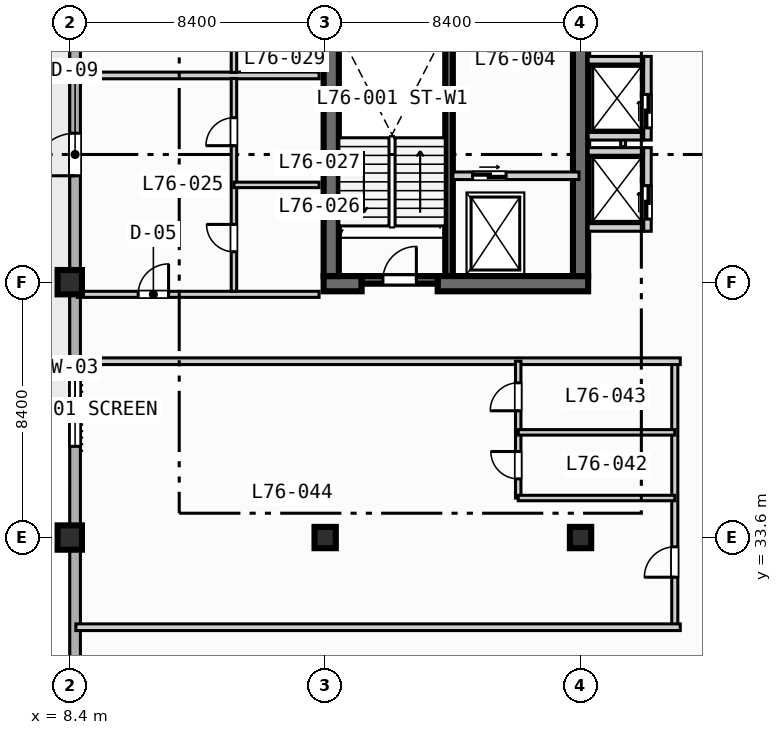
"""IFC4 building model, lengths in metres.
Left out: names, types, materials, properties, quantities, classifications, styles, units other than length and angle.
Written with IfcOpenShell. Run it as: python <this file> out.ifc"""

import sys

from ifc_helpers import new_model, si_unit, direction, frame, frame_2d, origin, origin_2d, place, context, subcontext, project, spatial, rectangle, extrude, element, fill, save


model = new_model("IFC4")
c1 = context("Model", 3, precision=1e-05, world=origin(), true_north=direction((0.0, 1.0)))
c2 = subcontext(c1, "Body", "Model", "MODEL_VIEW")
j1 = project(units=[si_unit("LENGTHUNIT", "METRE"), si_unit("PLANEANGLEUNIT", "RADIAN")], contexts=[c1])
p1 = place(None, origin())
s1 = spatial("IfcSite", under=j1, at=p1, CompositionType="ELEMENT")
p2 = place(p1, origin())
s2 = spatial("IfcBuilding", under=s1, at=p2, CompositionType="ELEMENT")
p3 = place(p2, frame((0.0, 0.0, 308.6)))
s3 = spatial("IfcBuildingStorey", under=s2, at=p3, CompositionType="ELEMENT", Elevation=308.6)
p4 = place(p3, frame((20.875, 42.2, 0.0), z_axis=(0.0, 0.0, 1.0), x_axis=(0.0, 1.0, 0.0)))
e1 = element("IfcWall", 1, at=p4, inside=s3, PredefinedType="SOLIDWALL", context=c2, shape_type="SweptSolid", body=[
    extrude(rectangle(XDim=8.05, YDim=0.25, at=frame_2d((4.025, 0.0))), origin(), (0.0, 0.0, 1.0), 3.67),
])
p5 = place(p3, frame((16.75, 41.95, 0.0), z_axis=(0.0, 0.0, 1.0), x_axis=(1.0, 0.0, 0.0)))
e2 = element("IfcWall", 2, at=p5, inside=s3, PredefinedType="SHEAR", context=c2, shape_type="SweptSolid", body=[
    extrude(rectangle(XDim=1.25, YDim=0.5, at=frame_2d((0.625, 0.0))), origin(), (0.0, 0.0, 1.0), 3.67),
])
p6 = place(p3, frame((20.5, 41.95, 0.0), z_axis=(0.0, 0.0, 1.0), x_axis=(1.0, 0.0, 0.0)))
e3 = element("IfcWall", 3, at=p6, inside=s3, PredefinedType="SHEAR", context=c2, shape_type="SweptSolid", body=[
    extrude(rectangle(XDim=4.95, YDim=0.5, at=frame_2d((2.475, 0.0))), origin(), (0.0, 0.0, 1.0), 3.67),
])
p7 = place(p3, frame((17.0, 42.2, 0.0), z_axis=(0.0, 0.0, 1.0), x_axis=(0.0, 1.0, 0.0)))
e4 = element("IfcWall", 4, at=p7, inside=s3, PredefinedType="SHEAR", context=c2, shape_type="SweptSolid", body=[
    extrude(rectangle(XDim=16.35, YDim=0.5, at=frame_2d((8.175, 0.0))), origin(), (0.0, 0.0, 1.0), 3.67),
])
p8 = place(p3, frame((25.2, 42.2, 0.0), z_axis=(0.0, 0.0, 1.0), x_axis=(0.0, 1.0, 0.0)))
e5 = element("IfcWall", 5, at=p8, inside=s3, PredefinedType="SHEAR", context=c2, shape_type="SweptSolid", body=[
    extrude(rectangle(XDim=8.6, YDim=0.5, at=frame_2d((4.3, 0.0))), origin(), (0.0, 0.0, 1.0), 3.67),
])
for number, where, z_axis, x_axis in (
    (6, (8.4, 33.6, 0.0), (0.0, 0.0, 1.0), (1.0, 0.0, 0.0)),
    (7, (8.4, 42.0, 0.0), (0.0, 0.0, 1.0), (1.0, 0.0, 0.0)),
):
    element("IfcColumn", number, at=place(p3, frame(where, z_axis=z_axis, x_axis=x_axis)), inside=s3, PredefinedType="COLUMN", context=c2, shape_type="SweptSolid", body=[
        extrude(rectangle(XDim=0.8, YDim=0.8, at=origin_2d()), origin(), (0.0, 0.0, 1.0), 3.9),
    ])
for number, where, z_axis, x_axis in (
    (8, (16.8, 33.6, 0.0), (0.0, 0.0, 1.0), (1.0, 0.0, 0.0)),
    (9, (25.2, 33.6, 0.0), (0.0, 0.0, 1.0), (1.0, 0.0, 0.0)),
):
    element("IfcColumn", number, at=place(p3, frame(where, z_axis=z_axis, x_axis=x_axis)), inside=s3, PredefinedType="COLUMN", context=c2, shape_type="SweptSolid", body=[
        extrude(rectangle(XDim=0.7, YDim=0.7, at=origin_2d()), origin(), (0.0, 0.0, 1.0), 3.9),
    ])
p9 = place(p3, frame((8.575, 11.575, 0.0), z_axis=(0.0, 0.0, 1.0), x_axis=(0.0, 1.0, 0.0)))
e10 = element("IfcWall", 10, at=p9, inside=s3, PredefinedType="STANDARD", context=c2, shape_type="SweptSolid", body=[
    extrude(rectangle(XDim=60.85, YDim=0.35, at=frame_2d((30.425, 0.0))), origin(), (0.0, 0.0, 1.0), 3.67),
])
p10 = place(p9, frame((33.925, 0.0, 0.0)))
e11 = element("IfcOpeningElement", 11, at=p10, cuts=e10, PredefinedType="OPENING", context=c2, shape_type="SweptSolid", body=[
    extrude(rectangle(XDim=1.4, YDim=2.2, at=frame_2d((0.7, 1.1))), frame((0.0, 0.185, 0.0), z_axis=(0.0, -1.0, 0.0), x_axis=(1.0, 0.0, 0.0)), (0.0, 0.0, 1.0), 0.37),
])
p11 = place(p9, frame((25.025, 0.0, 0.85)))
e12 = element("IfcOpeningElement", 12, at=p11, cuts=e10, PredefinedType="OPENING", context=c2, shape_type="SweptSolid", body=[
    extrude(rectangle(XDim=2.4, YDim=1.95, at=frame_2d((1.2, 0.975))), frame((0.0, 0.185, 0.0), z_axis=(0.0, -1.0, 0.0), x_axis=(1.0, 0.0, 0.0)), (0.0, 0.0, 1.0), 0.37),
])
p12 = place(p9, frame((41.825, 0.0, 0.85)))
e13 = element("IfcOpeningElement", 13, at=p12, cuts=e10, PredefinedType="OPENING", context=c2, shape_type="SweptSolid", body=[
    extrude(rectangle(XDim=2.4, YDim=1.95, at=frame_2d((1.2, 0.975))), frame((0.0, 0.185, 0.0), z_axis=(0.0, -1.0, 0.0), x_axis=(1.0, 0.0, 0.0)), (0.0, 0.0, 1.0), 0.37),
])
p13 = place(p3, frame((18.0, 42.075, 0.0), z_axis=(0.0, 0.0, 1.0), x_axis=(1.0, 0.0, 0.0)))
e14 = element("IfcWall", 14, at=p13, inside=s3, PredefinedType="SOLIDWALL", context=c2, shape_type="SweptSolid", body=[
    extrude(rectangle(XDim=2.5, YDim=0.25, at=frame_2d((1.25, 0.0))), origin(), (0.0, 0.0, 1.0), 3.67),
])
p14 = place(p13, frame((0.7, 0.0, 0.0)))
e15 = element("IfcOpeningElement", 15, at=p14, cuts=e14, PredefinedType="OPENING", context=c2, shape_type="SweptSolid", body=[
    extrude(rectangle(XDim=1.1, YDim=2.15, at=frame_2d((0.55, 1.075))), frame((0.0, 0.135, 0.0), z_axis=(0.0, -1.0, 0.0), x_axis=(1.0, 0.0, 0.0)), (0.0, 0.0, 1.0), 0.27),
])
p15 = place(p3, frame((21.0, 45.5, 0.0), z_axis=(0.0, 0.0, 1.0), x_axis=(1.0, 0.0, 0.0)))
e16 = element("IfcWall", 16, at=p15, inside=s3, PredefinedType="SOLIDWALL", context=c2, shape_type="SweptSolid", body=[
    extrude(rectangle(XDim=4.15, YDim=0.25, at=frame_2d((2.075, 0.0))), origin(), (0.0, 0.0, 1.0), 3.67),
])
p16 = place(p15, frame((0.65, 0.0, 0.0)))
e17 = element("IfcOpeningElement", 17, at=p16, cuts=e16, PredefinedType="OPENING", context=c2, shape_type="SweptSolid", body=[
    extrude(rectangle(XDim=1.1, YDim=2.15, at=frame_2d((0.55, 1.075))), frame((0.0, 0.135, 0.0), z_axis=(0.0, -1.0, 0.0), x_axis=(1.0, 0.0, 0.0)), (0.0, 0.0, 1.0), 0.27),
])
p17 = place(p3, frame((27.4, 43.675, 0.0), z_axis=(0.0, 0.0, 1.0), x_axis=(0.0, 1.0, 0.0)))
e18 = element("IfcWall", 18, at=p17, inside=s3, PredefinedType="SOLIDWALL", context=c2, shape_type="SweptSolid", body=[
    extrude(rectangle(XDim=2.75, YDim=0.25, at=frame_2d((1.375, 0.0))), origin(), (0.0, 0.0, 1.0), 3.67),
])
p18 = place(p17, frame((0.4, 0.0, 0.0)))
e19 = element("IfcOpeningElement", 19, at=p18, cuts=e18, PredefinedType="OPENING", context=c2, shape_type="SweptSolid", body=[
    extrude(rectangle(XDim=1.1, YDim=2.15, at=frame_2d((0.55, 1.075))), frame((0.0, 0.135, 0.0), z_axis=(0.0, -1.0, 0.0), x_axis=(1.0, 0.0, 0.0)), (0.0, 0.0, 1.0), 0.27),
])
for number, where, z_axis, x_axis in (
    (20, (25.45, 43.8, 0.0), (0.0, 0.0, 1.0), (1.0, 0.0, 0.0)),
    (21, (25.45, 46.3, 0.0), (0.0, 0.0, 1.0), (1.0, 0.0, 0.0)),
):
    element("IfcWall", number, at=place(p3, frame(where, z_axis=z_axis, x_axis=x_axis)), inside=s3, PredefinedType="SOLIDWALL", context=c2, shape_type="SweptSolid", body=[
        extrude(rectangle(XDim=1.825, YDim=0.25, at=frame_2d((0.913, 0.0))), origin(), (0.0, 0.0, 1.0), 3.67),
    ])
p19 = place(p3, frame((26.6, 46.46, 0.0), z_axis=(0.0, 0.0, 1.0), x_axis=(0.0, 1.0, 0.0)))
e22 = element("IfcWall", 22, at=p19, inside=s3, PredefinedType="PARTITIONING", context=c2, shape_type="SweptSolid", body=[
    extrude(rectangle(XDim=0.88, YDim=0.16, at=frame_2d((0.44, 0.0))), origin(), (0.0, 0.0, 1.0), 3.67),
])
p20 = place(p3, frame((27.4, 46.675, 0.0), z_axis=(0.0, 0.0, 1.0), x_axis=(0.0, 1.0, 0.0)))
e23 = element("IfcWall", 23, at=p20, inside=s3, PredefinedType="SOLIDWALL", context=c2, shape_type="SweptSolid", body=[
    extrude(rectangle(XDim=2.75, YDim=0.25, at=frame_2d((1.375, 0.0))), origin(), (0.0, 0.0, 1.0), 3.67),
])
p21 = place(p20, frame((0.4, 0.0, 0.0)))
e24 = element("IfcOpeningElement", 24, at=p21, cuts=e23, PredefinedType="OPENING", context=c2, shape_type="SweptSolid", body=[
    extrude(rectangle(XDim=1.1, YDim=2.15, at=frame_2d((0.55, 1.075))), frame((0.0, 0.135, 0.0), z_axis=(0.0, -1.0, 0.0), x_axis=(1.0, 0.0, 0.0)), (0.0, 0.0, 1.0), 0.27),
])
for number, where, z_axis, x_axis in (
    (25, (25.45, 46.8, 0.0), (0.0, 0.0, 1.0), (1.0, 0.0, 0.0)),
    (26, (25.45, 49.3, 0.0), (0.0, 0.0, 1.0), (1.0, 0.0, 0.0)),
):
    element("IfcWall", number, at=place(p3, frame(where, z_axis=z_axis, x_axis=x_axis)), inside=s3, PredefinedType="SOLIDWALL", context=c2, shape_type="SweptSolid", body=[
        extrude(rectangle(XDim=1.825, YDim=0.25, at=frame_2d((0.913, 0.0))), origin(), (0.0, 0.0, 1.0), 3.67),
    ])
p22 = place(p3, frame((8.65, 41.6, 0.0), z_axis=(0.0, 0.0, 1.0), x_axis=(1.0, 0.0, 0.0)))
e27 = element("IfcWall", 27, at=p22, inside=s3, PredefinedType="PARTITIONING", context=c2, shape_type="SweptSolid", body=[
    extrude(rectangle(XDim=7.95, YDim=0.2, at=frame_2d((3.975, 0.0))), origin(), (0.0, 0.0, 1.0), 3.67),
])
p23 = place(p22, frame((2.0, 0.0, 0.0)))
e28 = element("IfcOpeningElement", 28, at=p23, cuts=e27, PredefinedType="OPENING", context=c2, shape_type="SweptSolid", body=[
    extrude(rectangle(XDim=1.0, YDim=2.15, at=frame_2d((0.5, 1.075))), frame((0.0, 0.11, 0.0), z_axis=(0.0, -1.0, 0.0), x_axis=(1.0, 0.0, 0.0)), (0.0, 0.0, 1.0), 0.22),
])
p24 = place(p3, frame((8.65, 48.8, 0.0), z_axis=(0.0, 0.0, 1.0), x_axis=(1.0, 0.0, 0.0)))
e29 = element("IfcWall", 29, at=p24, inside=s3, PredefinedType="PARTITIONING", context=c2, shape_type="SweptSolid", body=[
    extrude(rectangle(XDim=7.95, YDim=0.22, at=frame_2d((3.975, 0.0))), origin(), (0.0, 0.0, 1.0), 3.67),
])
p25 = place(p3, frame((13.8, 41.7, 0.0), z_axis=(0.0, 0.0, 1.0), x_axis=(0.0, 1.0, 0.0)))
e30 = element("IfcWall", 30, at=p25, inside=s3, PredefinedType="PLUMBINGWALL", context=c2, shape_type="SweptSolid", body=[
    extrude(rectangle(XDim=7.0, YDim=0.18, at=frame_2d((3.5, 0.0))), origin(), (0.0, 0.0, 1.0), 3.67),
])
p26 = place(p25, frame((1.3, 0.0, 0.0)))
e31 = element("IfcOpeningElement", 31, at=p26, cuts=e30, PredefinedType="OPENING", context=c2, shape_type="SweptSolid", body=[
    extrude(rectangle(XDim=0.9, YDim=2.1, at=frame_2d((0.45, 1.05))), frame((0.0, 0.1, 0.0), z_axis=(0.0, -1.0, 0.0), x_axis=(1.0, 0.0, 0.0)), (0.0, 0.0, 1.0), 0.2),
])
p27 = place(p25, frame((4.79, 0.0, 0.0)))
e32 = element("IfcOpeningElement", 32, at=p27, cuts=e30, PredefinedType="OPENING", context=c2, shape_type="SweptSolid", body=[
    extrude(rectangle(XDim=0.92, YDim=2.1, at=frame_2d((0.46, 1.05))), frame((0.0, 0.1, 0.0), z_axis=(0.0, -1.0, 0.0), x_axis=(1.0, 0.0, 0.0)), (0.0, 0.0, 1.0), 0.2),
])
p28 = place(p3, frame((13.8, 45.2, 0.0), z_axis=(0.0, 0.0, 1.0), x_axis=(1.0, 0.0, 0.0)))
e33 = element("IfcWall", 33, at=p28, inside=s3, PredefinedType="PLUMBINGWALL", context=c2, shape_type="SweptSolid", body=[
    extrude(rectangle(XDim=2.8, YDim=0.18, at=frame_2d((1.4, 0.0))), origin(), (0.0, 0.0, 1.0), 3.67),
])
p29 = place(p3, frame((13.8, 48.9, 0.0), z_axis=(0.0, 0.0, 1.0), x_axis=(0.0, 1.0, 0.0)))
e34 = element("IfcWall", 34, at=p29, inside=s3, PredefinedType="PLUMBINGWALL", context=c2, shape_type="SweptSolid", body=[
    extrude(rectangle(XDim=10.0, YDim=0.18, at=frame_2d((5.0, 0.0))), origin(), (0.0, 0.0, 1.0), 3.67),
])
p30 = place(p29, frame((2.05, 0.0, 0.0)))
e35 = element("IfcOpeningElement", 35, at=p30, cuts=e34, PredefinedType="OPENING", context=c2, shape_type="SweptSolid", body=[
    extrude(rectangle(XDim=0.9, YDim=2.1, at=frame_2d((0.45, 1.05))), frame((0.0, 0.1, 0.0), z_axis=(0.0, -1.0, 0.0), x_axis=(1.0, 0.0, 0.0)), (0.0, 0.0, 1.0), 0.2),
])
p31 = place(p29, frame((7.04, 0.0, 0.0)))
e36 = element("IfcOpeningElement", 36, at=p31, cuts=e34, PredefinedType="OPENING", context=c2, shape_type="SweptSolid", body=[
    extrude(rectangle(XDim=0.92, YDim=2.1, at=frame_2d((0.46, 1.05))), frame((0.0, 0.1, 0.0), z_axis=(0.0, -1.0, 0.0), x_axis=(1.0, 0.0, 0.0)), (0.0, 0.0, 1.0), 0.2),
])
p32 = place(p3, frame((28.3, 30.65, 0.0), z_axis=(0.0, 0.0, 1.0), x_axis=(0.0, 1.0, 0.0)))
e37 = element("IfcWall", 37, at=p32, inside=s3, PredefinedType="PARTITIONING", context=c2, shape_type="SweptSolid", body=[
    extrude(rectangle(XDim=8.75, YDim=0.2, at=frame_2d((4.375, 0.0))), origin(), (0.0, 0.0, 1.0), 3.67),
])
p33 = place(p32, frame((1.645, 0.0, 0.0)))
e38 = element("IfcOpeningElement", 38, at=p33, cuts=e37, PredefinedType="OPENING", context=c2, shape_type="SweptSolid", body=[
    extrude(rectangle(XDim=1.0, YDim=2.15, at=frame_2d((0.5, 1.075))), frame((0.0, 0.11, 0.0), z_axis=(0.0, -1.0, 0.0), x_axis=(1.0, 0.0, 0.0)), (0.0, 0.0, 1.0), 0.22),
])
for number, where, z_axis, x_axis in (
    (39, (8.6, 30.65, 0.0), (0.0, 0.0, 1.0), (1.0, 0.0, 0.0)),
    (40, (8.6, 39.4, 0.0), (0.0, 0.0, 1.0), (1.0, 0.0, 0.0)),
):
    element("IfcWall", number, at=place(p3, frame(where, z_axis=z_axis, x_axis=x_axis)), inside=s3, PredefinedType="PARTITIONING", context=c2, shape_type="SweptSolid", body=[
        extrude(rectangle(XDim=19.88, YDim=0.22, at=frame_2d((9.94, 0.0))), origin(), (0.0, 0.0, 1.0), 3.67),
    ])
p34 = place(p3, frame((23.15, 34.9, 0.0), z_axis=(0.0, 0.0, 1.0), x_axis=(0.0, 1.0, 0.0)))
e41 = element("IfcWall", 41, at=p34, inside=s3, PredefinedType="PLUMBINGWALL", context=c2, shape_type="SweptSolid", body=[
    extrude(rectangle(XDim=4.5, YDim=0.18, at=frame_2d((2.25, 0.0))), origin(), (0.0, 0.0, 1.0), 3.67),
])
p35 = place(p34, frame((0.63, 0.0, 0.0)))
e42 = element("IfcOpeningElement", 42, at=p35, cuts=e41, PredefinedType="OPENING", context=c2, shape_type="SweptSolid", body=[
    extrude(rectangle(XDim=0.9, YDim=2.1, at=frame_2d((0.45, 1.05))), frame((0.0, 0.1, 0.0), z_axis=(0.0, -1.0, 0.0), x_axis=(1.0, 0.0, 0.0)), (0.0, 0.0, 1.0), 0.2),
])
p36 = place(p34, frame((2.87, 0.0, 0.0)))
e43 = element("IfcOpeningElement", 43, at=p36, cuts=e41, PredefinedType="OPENING", context=c2, shape_type="SweptSolid", body=[
    extrude(rectangle(XDim=0.92, YDim=2.1, at=frame_2d((0.46, 1.05))), frame((0.0, 0.1, 0.0), z_axis=(0.0, -1.0, 0.0), x_axis=(1.0, 0.0, 0.0)), (0.0, 0.0, 1.0), 0.2),
])
for number, where, z_axis, x_axis in (
    (44, (23.15, 34.9, 0.0), (0.0, 0.0, 1.0), (1.0, 0.0, 0.0)),
    (45, (23.15, 37.06, 0.0), (0.0, 0.0, 1.0), (1.0, 0.0, 0.0)),
):
    element("IfcWall", number, at=place(p3, frame(where, z_axis=z_axis, x_axis=x_axis)), inside=s3, PredefinedType="PLUMBINGWALL", context=c2, shape_type="SweptSolid", body=[
        extrude(rectangle(XDim=5.15, YDim=0.18, at=frame_2d((2.575, 0.0))), origin(), (0.0, 0.0, 1.0), 3.67),
    ])
p37 = place(p10, origin())
e46 = element("IfcDoor", 46, at=p37, inside=s3, OperationType="SINGLE_SWING_LEFT", PredefinedType="DOOR", context=c2, shape_type="SweptSolid", body=[
    extrude(rectangle(XDim=1.4, YDim=2.2, at=frame_2d((0.7, 1.1))), frame((0.0, 0.025, 0.0), z_axis=(0.0, -1.0, 0.0), x_axis=(1.0, 0.0, 0.0)), (0.0, 0.0, 1.0), 0.05),
])
fill(e11, e46)
p38 = place(p11, origin())
e47 = element("IfcWindow", 47, at=p38, inside=s3, PartitioningType="SINGLE_PANEL", PredefinedType="WINDOW", context=c2, shape_type="SweptSolid", body=[
    extrude(rectangle(XDim=2.4, YDim=1.95, at=frame_2d((1.2, 0.975))), frame((0.0, 0.03, 0.0), z_axis=(0.0, -1.0, 0.0), x_axis=(1.0, 0.0, 0.0)), (0.0, 0.0, 1.0), 0.06),
])
fill(e12, e47)
p39 = place(p14, origin())
e48 = element("IfcDoor", 48, at=p39, inside=s3, OperationType="SINGLE_SWING_RIGHT", PredefinedType="DOOR", context=c2, shape_type="SweptSolid", body=[
    extrude(rectangle(XDim=1.1, YDim=2.15, at=frame_2d((0.55, 1.075))), frame((0.0, 0.025, 0.0), z_axis=(0.0, -1.0, 0.0), x_axis=(1.0, 0.0, 0.0)), (0.0, 0.0, 1.0), 0.05),
])
fill(e15, e48)
p40 = place(p16, origin())
e49 = element("IfcDoor", 49, at=p40, inside=s3, OperationType="SLIDING_TO_LEFT", PredefinedType="DOOR", context=c2, shape_type="SweptSolid", body=[
    extrude(rectangle(XDim=1.1, YDim=2.15, at=frame_2d((0.55, 1.075))), frame((0.0, 0.025, 0.0), z_axis=(0.0, -1.0, 0.0), x_axis=(1.0, 0.0, 0.0)), (0.0, 0.0, 1.0), 0.05),
])
fill(e17, e49)
p41 = place(p18, origin())
e50 = element("IfcDoor", 50, at=p41, inside=s3, OperationType="SLIDING_TO_LEFT", PredefinedType="DOOR", context=c2, shape_type="SweptSolid", body=[
    extrude(rectangle(XDim=1.1, YDim=2.15, at=frame_2d((0.55, 1.075))), frame((0.0, 0.025, 0.0), z_axis=(0.0, -1.0, 0.0), x_axis=(1.0, 0.0, 0.0)), (0.0, 0.0, 1.0), 0.05),
])
fill(e19, e50)
p42 = place(p21, origin())
e51 = element("IfcDoor", 51, at=p42, inside=s3, OperationType="SLIDING_TO_LEFT", PredefinedType="DOOR", context=c2, shape_type="SweptSolid", body=[
    extrude(rectangle(XDim=1.1, YDim=2.15, at=frame_2d((0.55, 1.075))), frame((0.0, 0.025, 0.0), z_axis=(0.0, -1.0, 0.0), x_axis=(1.0, 0.0, 0.0)), (0.0, 0.0, 1.0), 0.05),
])
fill(e24, e51)
p43 = place(p23, origin())
e52 = element("IfcDoor", 52, at=p43, inside=s3, OperationType="SINGLE_SWING_RIGHT", PredefinedType="DOOR", context=c2, shape_type="SweptSolid", body=[
    extrude(rectangle(XDim=1.0, YDim=2.15, at=frame_2d((0.5, 1.075))), frame((0.0, 0.025, 0.0), z_axis=(0.0, -1.0, 0.0), x_axis=(1.0, 0.0, 0.0)), (0.0, 0.0, 1.0), 0.05),
])
fill(e28, e52)
p44 = place(p26, origin())
e53 = element("IfcDoor", 53, at=p44, inside=s3, OperationType="SINGLE_SWING_RIGHT", PredefinedType="DOOR", context=c2, shape_type="SweptSolid", body=[
    extrude(rectangle(XDim=0.9, YDim=2.1, at=frame_2d((0.45, 1.05))), frame((0.0, 0.025, 0.0), z_axis=(0.0, -1.0, 0.0), x_axis=(1.0, 0.0, 0.0)), (0.0, 0.0, 1.0), 0.05),
])
fill(e31, e53)
p45 = place(p27, origin())
e54 = element("IfcDoor", 54, at=p45, inside=s3, OperationType="SINGLE_SWING_LEFT", PredefinedType="DOOR", context=c2, shape_type="SweptSolid", body=[
    extrude(rectangle(XDim=0.92, YDim=2.1, at=frame_2d((0.46, 1.05))), frame((0.0, 0.025, 0.0), z_axis=(0.0, -1.0, 0.0), x_axis=(1.0, 0.0, 0.0)), (0.0, 0.0, 1.0), 0.05),
])
fill(e32, e54)
p46 = place(p33, origin())
e55 = element("IfcDoor", 55, at=p46, inside=s3, OperationType="SINGLE_SWING_LEFT", PredefinedType="DOOR", context=c2, shape_type="SweptSolid", body=[
    extrude(rectangle(XDim=1.0, YDim=2.15, at=frame_2d((0.5, 1.075))), frame((0.0, 0.025, 0.0), z_axis=(0.0, -1.0, 0.0), x_axis=(1.0, 0.0, 0.0)), (0.0, 0.0, 1.0), 0.05),
])
fill(e38, e55)
p47 = place(p35, origin())
e56 = element("IfcDoor", 56, at=p47, inside=s3, OperationType="SINGLE_SWING_RIGHT", PredefinedType="DOOR", context=c2, shape_type="SweptSolid", body=[
    extrude(rectangle(XDim=0.9, YDim=2.1, at=frame_2d((0.45, 1.05))), frame((0.0, 0.025, 0.0), z_axis=(0.0, -1.0, 0.0), x_axis=(1.0, 0.0, 0.0)), (0.0, 0.0, 1.0), 0.05),
])
fill(e42, e56)
p48 = place(p36, origin())
e57 = element("IfcDoor", 57, at=p48, inside=s3, OperationType="SINGLE_SWING_LEFT", PredefinedType="DOOR", context=c2, shape_type="SweptSolid", body=[
    extrude(rectangle(XDim=0.92, YDim=2.1, at=frame_2d((0.46, 1.05))), frame((0.0, 0.025, 0.0), z_axis=(0.0, -1.0, 0.0), x_axis=(1.0, 0.0, 0.0)), (0.0, 0.0, 1.0), 0.05),
])
fill(e43, e57)
save(model, sys.argv[1])
